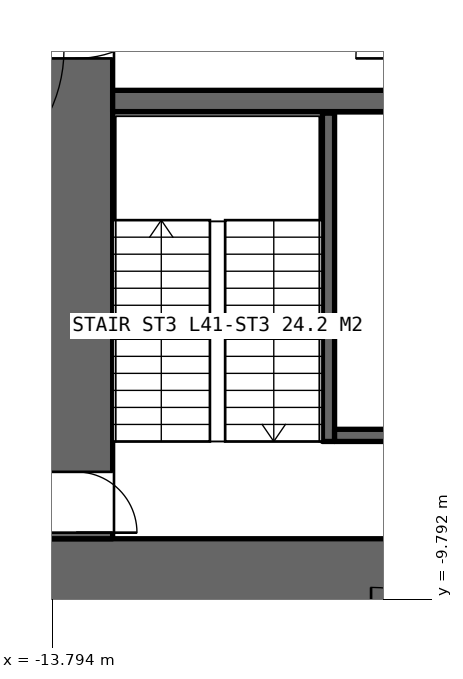
"""IFC4 building model, lengths in metres.
Left out: names, types, materials, properties, quantities, classifications, styles, units other than length and angle.
Written with IfcOpenShell. Run it as: python <this file> out.ifc"""

import sys

from ifc_helpers import new_model, si_unit, direction, frame, frame_2d, origin, place, context, subcontext, project, spatial, rectangle, extrude, element, fill, save


model = new_model("IFC4")
c1 = context("Model", 3, precision=1e-05, world=origin(), true_north=direction((0.0, 1.0)))
c2 = subcontext(c1, "Body", "Model", "MODEL_VIEW")
j1 = project(units=[si_unit("LENGTHUNIT", "METRE"), si_unit("PLANEANGLEUNIT", "RADIAN")], contexts=[c1])
p1 = place(None, origin())
s1 = spatial("IfcSite", under=j1, at=p1, CompositionType="ELEMENT")
p2 = place(p1, origin())
s2 = spatial("IfcBuilding", under=s1, at=p2, CompositionType="ELEMENT")
p3 = place(p2, frame((0.0, 0.0, 189.8)))
s3 = spatial("IfcBuildingStorey", under=s2, at=p3, CompositionType="ELEMENT", Elevation=189.8)
p4 = place(p3, frame((-14.0, -9.4, 0.0), z_axis=(0.0, 0.0, 1.0), x_axis=(1.0, 0.0, 0.0)))
e1 = element("IfcWall", 1, at=p4, inside=s3, PredefinedType="SHEAR", context=c2, shape_type="SweptSolid", body=[
    extrude(rectangle(XDim=28.0, YDim=1.2, at=frame_2d((14.0, 0.0))), origin(), (0.0, 0.0, 1.0), 5.0),
])
p5 = place(p4, frame((22.9, 0.0, 0.0)))
e2 = element("IfcOpeningElement", 2, at=p5, cuts=e1, PredefinedType="OPENING", context=c2, shape_type="SweptSolid", body=[
    extrude(rectangle(XDim=2.2, YDim=2.7, at=frame_2d((1.1, 1.35))), frame((0.0, 0.61, 0.0), z_axis=(0.0, -1.0, 0.0), x_axis=(1.0, 0.0, 0.0)), (0.0, 0.0, 1.0), 1.22),
])
p6 = place(p3, frame((-13.4, 8.8, 0.0), z_axis=(0.0, 0.0, 1.0), x_axis=(0.0, -1.0, 0.0)))
e3 = element("IfcWall", 3, at=p6, inside=s3, PredefinedType="SHEAR", context=c2, shape_type="SweptSolid", body=[
    extrude(rectangle(XDim=17.6, YDim=1.2, at=frame_2d((8.8, 0.0))), origin(), (0.0, 0.0, 1.0), 5.0),
])
p7 = place(p6, frame((7.9, 0.0, 0.0)))
e4 = element("IfcOpeningElement", 4, at=p7, cuts=e3, PredefinedType="OPENING", context=c2, shape_type="SweptSolid", body=[
    extrude(rectangle(XDim=1.8, YDim=2.4, at=frame_2d((0.9, 1.2))), frame((0.0, 0.61, 0.0), z_axis=(0.0, -1.0, 0.0), x_axis=(1.0, 0.0, 0.0)), (0.0, 0.0, 1.0), 1.22),
])
p8 = place(p6, frame((16.5, 0.0, 0.0)))
e5 = element("IfcOpeningElement", 5, at=p8, cuts=e3, PredefinedType="OPENING", context=c2, shape_type="SweptSolid", body=[
    extrude(rectangle(XDim=1.0, YDim=2.4, at=frame_2d((0.5, 1.2))), frame((0.0, 0.61, 0.0), z_axis=(0.0, -1.0, 0.0), x_axis=(1.0, 0.0, 0.0)), (0.0, 0.0, 1.0), 1.22),
])
p9 = place(p3, frame((-12.8, -1.6, 0.0), z_axis=(0.0, 0.0, 1.0), x_axis=(1.0, 0.0, 0.0)))
e6 = element("IfcWall", 6, at=p9, inside=s3, PredefinedType="SHEAR", context=c2, shape_type="SweptSolid", body=[
    extrude(rectangle(XDim=5.6, YDim=0.35, at=frame_2d((2.8, 0.0))), origin(), (0.0, 0.0, 1.0), 5.0),
])
p10 = place(p3, frame((-9.25, -7.2, 0.0), z_axis=(0.0, 0.0, 1.0), x_axis=(0.0, 1.0, 0.0)))
e7 = element("IfcWall", 7, at=p10, inside=s3, PredefinedType="SOLIDWALL", context=c2, shape_type="SweptSolid", body=[
    extrude(rectangle(XDim=5.4, YDim=0.2, at=frame_2d((2.7, 0.0))), origin(), (0.0, 0.0, 1.0), 5.0),
])
p11 = place(p3, frame((-9.15, -7.1, 0.0), z_axis=(0.0, 0.0, 1.0), x_axis=(1.0, 0.0, 0.0)))
e8 = element("IfcWall", 8, at=p11, inside=s3, PredefinedType="SOLIDWALL", context=c2, shape_type="SweptSolid", body=[
    extrude(rectangle(XDim=1.95, YDim=0.2, at=frame_2d((0.975, 0.0))), origin(), (0.0, 0.0, 1.0), 5.0),
])
p12 = place(p7, origin())
e9 = element("IfcDoor", 9, at=p12, inside=s3, OperationType="DOUBLE_DOOR_SINGLE_SWING", PredefinedType="DOOR", context=c2, shape_type="SweptSolid", body=[
    extrude(rectangle(XDim=1.8, YDim=2.4, at=frame_2d((0.9, 1.2))), frame((0.0, 0.025, 0.0), z_axis=(0.0, -1.0, 0.0), x_axis=(1.0, 0.0, 0.0)), (0.0, 0.0, 1.0), 0.05),
])
fill(e4, e9)
p13 = place(p8, origin())
e10 = element("IfcDoor", 10, at=p13, inside=s3, OperationType="SINGLE_SWING_RIGHT", PredefinedType="DOOR", context=c2, shape_type="SweptSolid", body=[
    extrude(rectangle(XDim=1.0, YDim=2.4, at=frame_2d((0.5, 1.2))), frame((0.0, 0.025, 0.0), z_axis=(0.0, -1.0, 0.0), x_axis=(1.0, 0.0, 0.0)), (0.0, 0.0, 1.0), 0.05),
])
fill(e5, e10)
save(model, sys.argv[1])
